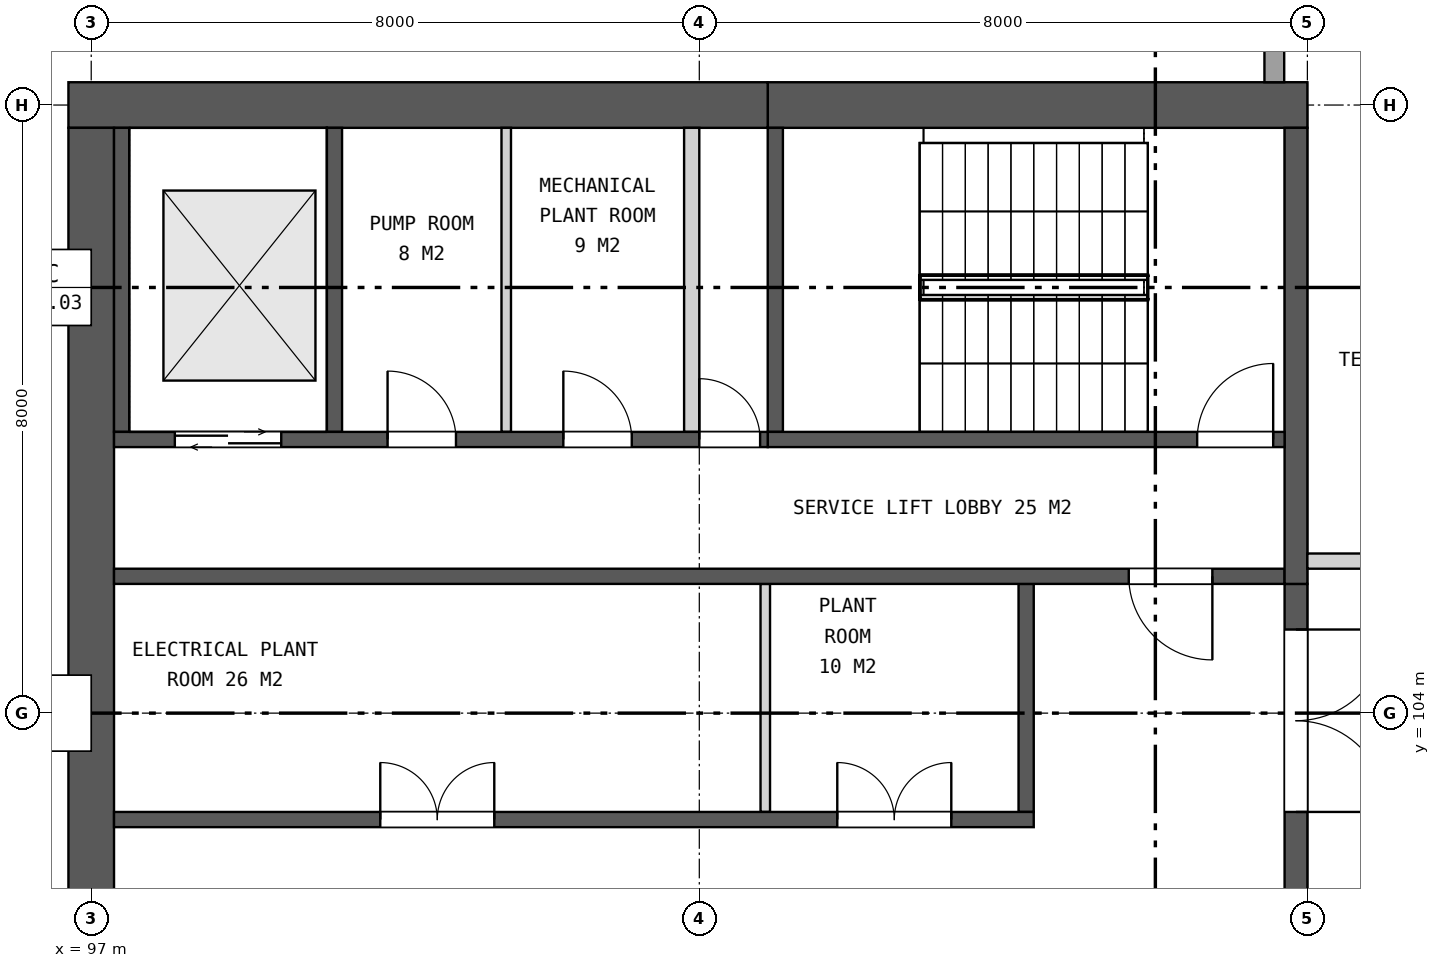
"""IFC4 building model, lengths in metres.
Left out: names, types, materials, properties, quantities, classifications, styles, units other than length and angle.
Written with IfcOpenShell. Run it as: python <this file> out.ifc"""

import sys

from ifc_helpers import new_model, si_unit, direction, frame, frame_2d, origin, place, context, subcontext, project, spatial, rectangle, extrude, element, fill, save


model = new_model("IFC4")
c1 = context("Model", 3, precision=1e-05, world=origin(), true_north=direction((0.0, 1.0)))
c2 = subcontext(c1, "Body", "Model", "MODEL_VIEW")
j1 = project(units=[si_unit("LENGTHUNIT", "METRE"), si_unit("PLANEANGLEUNIT", "RADIAN")], contexts=[c1])
p1 = place(None, origin())
s1 = spatial("IfcSite", under=j1, at=p1, CompositionType="ELEMENT")
p2 = place(p1, origin())
s2 = spatial("IfcBuilding", under=s1, at=p2, CompositionType="ELEMENT")
p3 = place(p2, frame((0.0, 0.0, 237.7)))
s3 = spatial("IfcBuildingStorey", under=s2, at=p3, CompositionType="ELEMENT", Elevation=237.7)
p4 = place(p3, frame((113.0, 112.0, 0.0), z_axis=(0.0, 0.0, 1.0), x_axis=(-1.0, 0.0, 0.0)))
e1 = element("IfcWall", 1, at=p4, inside=s3, PredefinedType="SHEAR", context=c2, shape_type="SweptSolid", body=[
    extrude(rectangle(XDim=7.1, YDim=0.6, at=frame_2d((3.55, 0.0))), origin(), (0.0, 0.0, 1.0), 7.4),
])
p5 = place(p3, frame((105.9, 112.0, 0.0), z_axis=(0.0, 0.0, 1.0), x_axis=(-1.0, 0.0, 0.0)))
e2 = element("IfcWall", 2, at=p5, inside=s3, PredefinedType="SHEAR", context=c2, shape_type="SweptSolid", body=[
    extrude(rectangle(XDim=9.2, YDim=0.6, at=frame_2d((4.6, 0.0))), origin(), (0.0, 0.0, 1.0), 7.4),
])
p6 = place(p3, frame((97.0, 111.7, 0.0), z_axis=(0.0, 0.0, 1.0), x_axis=(0.0, -1.0, 0.0)))
e3 = element("IfcWall", 3, at=p6, inside=s3, PredefinedType="SHEAR", context=c2, shape_type="SweptSolid", body=[
    extrude(rectangle(XDim=23.4, YDim=0.6, at=frame_2d((11.7, 0.0))), origin(), (0.0, 0.0, 1.0), 7.4),
])
p7 = place(p3, frame((112.85, 105.7, 0.0), z_axis=(0.0, 0.0, 1.0), x_axis=(0.0, -1.0, 0.0)))
e4 = element("IfcWall", 4, at=p7, inside=s3, PredefinedType="SHEAR", context=c2, shape_type="SweptSolid", body=[
    extrude(rectangle(XDim=11.4, YDim=0.3, at=frame_2d((5.7, 0.0))), origin(), (0.0, 0.0, 1.0), 7.4),
])
p8 = place(p7, frame((0.6, 0.0, 0.0)))
e5 = element("IfcOpeningElement", 5, at=p8, cuts=e4, PredefinedType="OPENING", context=c2, shape_type="SweptSolid", body=[
    extrude(rectangle(XDim=2.4, YDim=2.4, at=frame_2d((1.2, 1.2))), frame((0.0, 0.16, 0.0), z_axis=(0.0, -1.0, 0.0), x_axis=(1.0, 0.0, 0.0)), (0.0, 0.0, 1.0), 0.32),
])
p9 = place(p7, frame((4.5, 0.0, 0.0)))
e6 = element("IfcOpeningElement", 6, at=p9, cuts=e4, PredefinedType="OPENING", context=c2, shape_type="SweptSolid", body=[
    extrude(rectangle(XDim=2.4, YDim=2.4, at=frame_2d((1.2, 1.2))), frame((0.0, 0.16, 0.0), z_axis=(0.0, -1.0, 0.0), x_axis=(1.0, 0.0, 0.0)), (0.0, 0.0, 1.0), 0.32),
])
p10 = place(p7, frame((8.4, 0.0, 0.0)))
e7 = element("IfcOpeningElement", 7, at=p10, cuts=e4, PredefinedType="OPENING", context=c2, shape_type="SweptSolid", body=[
    extrude(rectangle(XDim=2.4, YDim=2.4, at=frame_2d((1.2, 1.2))), frame((0.0, 0.16, 0.0), z_axis=(0.0, -1.0, 0.0), x_axis=(1.0, 0.0, 0.0)), (0.0, 0.0, 1.0), 0.32),
])
p11 = place(p3, frame((109.3, 105.7, 0.0), z_axis=(0.0, 0.0, 1.0), x_axis=(0.0, -1.0, 0.0)))
e8 = element("IfcWall", 8, at=p11, inside=s3, PredefinedType="SHEAR", context=c2, shape_type="SweptSolid", body=[
    extrude(rectangle(XDim=3.0, YDim=0.2, at=frame_2d((1.5, 0.0))), origin(), (0.0, 0.0, 1.0), 7.4),
])
p12 = place(p3, frame((105.868, 105.7, 0.0), z_axis=(0.0, 0.0, 1.0), x_axis=(0.0, -1.0, 0.0)))
e9 = element("IfcWall", 9, at=p12, inside=s3, PredefinedType="PARTITIONING", context=c2, shape_type="SweptSolid", body=[
    extrude(rectangle(XDim=3.0, YDim=0.125, at=frame_2d((1.5, 0.0))), origin(), (0.0, 0.0, 1.0), 7.4),
])
p13 = place(p3, frame((109.4, 102.6, 0.0), z_axis=(0.0, 0.0, 1.0), x_axis=(-1.0, 0.0, 0.0)))
e10 = element("IfcWall", 10, at=p13, inside=s3, PredefinedType="SHEAR", context=c2, shape_type="SweptSolid", body=[
    extrude(rectangle(XDim=12.1, YDim=0.2, at=frame_2d((6.05, 0.0))), origin(), (0.0, 0.0, 1.0), 7.4),
])
p14 = place(p13, frame((1.085, 0.0, 0.0)))
e11 = element("IfcOpeningElement", 11, at=p14, cuts=e10, PredefinedType="OPENING", context=c2, shape_type="SweptSolid", body=[
    extrude(rectangle(XDim=1.5, YDim=2.1, at=frame_2d((0.75, 1.05))), frame((0.0, 0.11, 0.0), z_axis=(0.0, -1.0, 0.0), x_axis=(1.0, 0.0, 0.0)), (0.0, 0.0, 1.0), 0.22),
])
p15 = place(p13, frame((7.097, 0.0, 0.0)))
e12 = element("IfcOpeningElement", 12, at=p15, cuts=e10, PredefinedType="OPENING", context=c2, shape_type="SweptSolid", body=[
    extrude(rectangle(XDim=1.5, YDim=2.1, at=frame_2d((0.75, 1.05))), frame((0.0, 0.11, 0.0), z_axis=(0.0, -1.0, 0.0), x_axis=(1.0, 0.0, 0.0)), (0.0, 0.0, 1.0), 0.22),
])
p16 = place(p3, frame((112.7, 105.8, 0.0), z_axis=(0.0, 0.0, 1.0), x_axis=(-1.0, 0.0, 0.0)))
e13 = element("IfcWall", 13, at=p16, inside=s3, PredefinedType="SHEAR", context=c2, shape_type="SweptSolid", body=[
    extrude(rectangle(XDim=15.4, YDim=0.2, at=frame_2d((7.7, 0.0))), origin(), (0.0, 0.0, 1.0), 7.4),
])
p17 = place(p16, frame((0.95, 0.0, 0.0)))
e14 = element("IfcOpeningElement", 14, at=p17, cuts=e13, PredefinedType="OPENING", context=c2, shape_type="SweptSolid", body=[
    extrude(rectangle(XDim=1.1, YDim=2.1, at=frame_2d((0.55, 1.05))), frame((0.0, 0.11, 0.0), z_axis=(0.0, -1.0, 0.0), x_axis=(1.0, 0.0, 0.0)), (0.0, 0.0, 1.0), 0.22),
])
p18 = place(p3, frame((112.85, 111.7, 0.0), z_axis=(0.0, 0.0, 1.0), x_axis=(0.0, -1.0, 0.0)))
e15 = element("IfcWall", 15, at=p18, inside=s3, PredefinedType="SHEAR", context=c2, shape_type="SweptSolid", body=[
    extrude(rectangle(XDim=6.0, YDim=0.3, at=frame_2d((3.0, 0.0))), origin(), (0.0, 0.0, 1.0), 7.4),
])
for number, where, z_axis, x_axis in (
    (16, (106.0, 111.7, 0.0), (0.0, 0.0, 1.0), (0.0, -1.0, 0.0)),
    (17, (100.2, 111.7, 0.0), (0.0, 0.0, 1.0), (0.0, -1.0, 0.0)),
    (18, (97.4, 111.7, 0.0), (0.0, 0.0, 1.0), (0.0, -1.0, 0.0)),
):
    element("IfcWall", number, at=place(p3, frame(where, z_axis=z_axis, x_axis=x_axis)), inside=s3, PredefinedType="SHEAR", context=c2, shape_type="SweptSolid", body=[
        extrude(rectangle(XDim=4.0, YDim=0.2, at=frame_2d((2.0, 0.0))), origin(), (0.0, 0.0, 1.0), 7.4),
    ])
p19 = place(p3, frame((104.9, 111.7, 0.0), z_axis=(0.0, 0.0, 1.0), x_axis=(0.0, -1.0, 0.0)))
e19 = element("IfcWall", 19, at=p19, inside=s3, PredefinedType="PARTITIONING", context=c2, shape_type="SweptSolid", body=[
    extrude(rectangle(XDim=4.0, YDim=0.2, at=frame_2d((2.0, 0.0))), origin(), (0.0, 0.0, 1.0), 7.4),
])
p20 = place(p3, frame((102.46, 111.7, 0.0), z_axis=(0.0, 0.0, 1.0), x_axis=(0.0, -1.0, 0.0)))
e20 = element("IfcWall", 20, at=p20, inside=s3, PredefinedType="PARTITIONING", context=c2, shape_type="SweptSolid", body=[
    extrude(rectangle(XDim=4.0, YDim=0.125, at=frame_2d((2.0, 0.0))), origin(), (0.0, 0.0, 1.0), 7.4),
])
p21 = place(p3, frame((112.7, 107.6, 0.0), z_axis=(0.0, 0.0, 1.0), x_axis=(-1.0, 0.0, 0.0)))
e21 = element("IfcWall", 21, at=p21, inside=s3, PredefinedType="SHEAR", context=c2, shape_type="SweptSolid", body=[
    extrude(rectangle(XDim=6.8, YDim=0.2, at=frame_2d((3.4, 0.0))), origin(), (0.0, 0.0, 1.0), 7.4),
])
p22 = place(p21, frame((0.15, 0.0, 0.0)))
e22 = element("IfcOpeningElement", 22, at=p22, cuts=e21, PredefinedType="OPENING", context=c2, shape_type="SweptSolid", body=[
    extrude(rectangle(XDim=1.0, YDim=2.1, at=frame_2d((0.5, 1.05))), frame((0.0, 0.11, 0.0), z_axis=(0.0, -1.0, 0.0), x_axis=(1.0, 0.0, 0.0)), (0.0, 0.0, 1.0), 0.22),
])
p23 = place(p3, frame((105.9, 107.6, 0.0), z_axis=(0.0, 0.0, 1.0), x_axis=(-1.0, 0.0, 0.0)))
e23 = element("IfcWall", 23, at=p23, inside=s3, PredefinedType="SHEAR", context=c2, shape_type="SweptSolid", body=[
    extrude(rectangle(XDim=8.6, YDim=0.2, at=frame_2d((4.3, 0.0))), origin(), (0.0, 0.0, 1.0), 7.4),
])
p24 = place(p23, frame((0.1, 0.0, 0.0)))
e24 = element("IfcOpeningElement", 24, at=p24, cuts=e23, PredefinedType="OPENING", context=c2, shape_type="SweptSolid", body=[
    extrude(rectangle(XDim=0.8, YDim=2.1, at=frame_2d((0.4, 1.05))), frame((0.0, 0.11, 0.0), z_axis=(0.0, -1.0, 0.0), x_axis=(1.0, 0.0, 0.0)), (0.0, 0.0, 1.0), 0.22),
])
p25 = place(p23, frame((1.789, 0.0, 0.0)))
e25 = element("IfcOpeningElement", 25, at=p25, cuts=e23, PredefinedType="OPENING", context=c2, shape_type="SweptSolid", body=[
    extrude(rectangle(XDim=0.9, YDim=2.1, at=frame_2d((0.45, 1.05))), frame((0.0, 0.11, 0.0), z_axis=(0.0, -1.0, 0.0), x_axis=(1.0, 0.0, 0.0)), (0.0, 0.0, 1.0), 0.22),
])
p26 = place(p23, frame((4.101, 0.0, 0.0)))
e26 = element("IfcOpeningElement", 26, at=p26, cuts=e23, PredefinedType="OPENING", context=c2, shape_type="SweptSolid", body=[
    extrude(rectangle(XDim=0.9, YDim=2.1, at=frame_2d((0.45, 1.05))), frame((0.0, 0.11, 0.0), z_axis=(0.0, -1.0, 0.0), x_axis=(1.0, 0.0, 0.0)), (0.0, 0.0, 1.0), 0.22),
])
p27 = place(p23, frame((6.4, 0.0, 0.0)))
e27 = element("IfcOpeningElement", 27, at=p27, cuts=e23, PredefinedType="OPENING", context=c2, shape_type="SweptSolid", body=[
    extrude(rectangle(XDim=1.4, YDim=2.1, at=frame_2d((0.7, 1.05))), frame((0.0, 0.11, 0.0), z_axis=(0.0, -1.0, 0.0), x_axis=(1.0, 0.0, 0.0)), (0.0, 0.0, 1.0), 0.22),
])
p28 = place(p3, frame((112.565, 120.0, 0.0), z_axis=(0.0, 0.0, 1.0), x_axis=(0.0, -1.0, 0.0)))
e28 = element("IfcWall", 28, at=p28, inside=s3, PredefinedType="SOLIDWALL", context=c2, shape_type="SweptSolid", body=[
    extrude(rectangle(XDim=7.7, YDim=0.26, at=frame_2d((3.85, 0.0))), origin(), (0.0, 0.0, 1.0), 7.1),
])
p29 = place(p28, frame((0.8, 0.0, 2.2)))
e29 = element("IfcOpeningElement", 29, at=p29, cuts=e28, PredefinedType="OPENING", context=c2, shape_type="SweptSolid", body=[
    extrude(rectangle(XDim=2.0, YDim=3.0, at=frame_2d((1.0, 1.5))), frame((0.0, 0.14, 0.0), z_axis=(0.0, -1.0, 0.0), x_axis=(1.0, 0.0, 0.0)), (0.0, 0.0, 1.0), 0.28),
])
p30 = place(p28, frame((5.2, 0.0, 1.2)))
e30 = element("IfcOpeningElement", 30, at=p30, cuts=e28, PredefinedType="OPENING", context=c2, shape_type="SweptSolid", body=[
    extrude(rectangle(XDim=2.0, YDim=3.0, at=frame_2d((1.0, 1.5))), frame((0.0, 0.14, 0.0), z_axis=(0.0, -1.0, 0.0), x_axis=(1.0, 0.0, 0.0)), (0.0, 0.0, 1.0), 0.28),
])
p31 = place(p3, frame((113.0, 106.0, 0.0), z_axis=(0.0, 0.0, 1.0), x_axis=(1.0, 0.0, 0.0)))
e31 = element("IfcWall", 31, at=p31, inside=s3, PredefinedType="SOLIDWALL", context=c2, shape_type="SweptSolid", body=[
    extrude(rectangle(XDim=5.5, YDim=0.2, at=frame_2d((2.75, 0.0))), origin(), (0.0, 0.0, 1.0), 6.643),
])
p32 = place(p31, frame((2.25, 0.0, 0.0)))
e32 = element("IfcOpeningElement", 32, at=p32, cuts=e31, PredefinedType="OPENING", context=c2, shape_type="SweptSolid", body=[
    extrude(rectangle(XDim=1.0, YDim=2.1, at=frame_2d((0.5, 1.05))), frame((0.0, 0.11, 0.0), z_axis=(0.0, -1.0, 0.0), x_axis=(1.0, 0.0, 0.0)), (0.0, 0.0, 1.0), 0.22),
])
p33 = place(p8, origin())
e33 = element("IfcDoor", 33, at=p33, inside=s3, OperationType="DOUBLE_DOOR_SINGLE_SWING", PredefinedType="DOOR", context=c2, shape_type="SweptSolid", body=[
    extrude(rectangle(XDim=2.4, YDim=2.4, at=frame_2d((1.2, 1.2))), frame((0.0, 0.025, 0.0), z_axis=(0.0, -1.0, 0.0), x_axis=(1.0, 0.0, 0.0)), (0.0, 0.0, 1.0), 0.05),
])
fill(e5, e33)
p34 = place(p14, frame((1.5, 0.0, 0.0), z_axis=(0.0, 0.0, 1.0), x_axis=(-1.0, 0.0, 0.0)))
e34 = element("IfcDoor", 34, at=p34, inside=s3, OperationType="DOUBLE_DOOR_SINGLE_SWING", PredefinedType="DOOR", context=c2, shape_type="SweptSolid", body=[
    extrude(rectangle(XDim=1.5, YDim=2.1, at=frame_2d((0.75, 1.05))), frame((0.0, 0.025, 0.0), z_axis=(0.0, -1.0, 0.0), x_axis=(1.0, 0.0, 0.0)), (0.0, 0.0, 1.0), 0.05),
])
fill(e11, e34)
p35 = place(p15, frame((1.5, 0.0, 0.0), z_axis=(0.0, 0.0, 1.0), x_axis=(-1.0, 0.0, 0.0)))
e35 = element("IfcDoor", 35, at=p35, inside=s3, OperationType="DOUBLE_DOOR_SINGLE_SWING", PredefinedType="DOOR", context=c2, shape_type="SweptSolid", body=[
    extrude(rectangle(XDim=1.5, YDim=2.1, at=frame_2d((0.75, 1.05))), frame((0.0, 0.025, 0.0), z_axis=(0.0, -1.0, 0.0), x_axis=(1.0, 0.0, 0.0)), (0.0, 0.0, 1.0), 0.05),
])
fill(e12, e35)
p36 = place(p17, origin())
e36 = element("IfcDoor", 36, at=p36, inside=s3, OperationType="SINGLE_SWING_LEFT", PredefinedType="DOOR", context=c2, shape_type="SweptSolid", body=[
    extrude(rectangle(XDim=1.1, YDim=2.1, at=frame_2d((0.55, 1.05))), frame((0.0, 0.025, 0.0), z_axis=(0.0, -1.0, 0.0), x_axis=(1.0, 0.0, 0.0)), (0.0, 0.0, 1.0), 0.05),
])
fill(e14, e36)
p37 = place(p22, frame((1.0, 0.0, 0.0), z_axis=(0.0, 0.0, 1.0), x_axis=(-1.0, 0.0, 0.0)))
e37 = element("IfcDoor", 37, at=p37, inside=s3, OperationType="SINGLE_SWING_RIGHT", PredefinedType="DOOR", context=c2, shape_type="SweptSolid", body=[
    extrude(rectangle(XDim=1.0, YDim=2.1, at=frame_2d((0.5, 1.05))), frame((0.0, 0.025, 0.0), z_axis=(0.0, -1.0, 0.0), x_axis=(1.0, 0.0, 0.0)), (0.0, 0.0, 1.0), 0.05),
])
fill(e22, e37)
p38 = place(p24, frame((0.8, 0.0, 0.0), z_axis=(0.0, 0.0, 1.0), x_axis=(-1.0, 0.0, 0.0)))
e38 = element("IfcDoor", 38, at=p38, inside=s3, OperationType="SINGLE_SWING_LEFT", PredefinedType="DOOR", context=c2, shape_type="SweptSolid", body=[
    extrude(rectangle(XDim=0.8, YDim=2.1, at=frame_2d((0.4, 1.05))), frame((0.0, 0.025, 0.0), z_axis=(0.0, -1.0, 0.0), x_axis=(1.0, 0.0, 0.0)), (0.0, 0.0, 1.0), 0.05),
])
fill(e24, e38)
p39 = place(p25, frame((0.9, 0.0, 0.0), z_axis=(0.0, 0.0, 1.0), x_axis=(-1.0, 0.0, 0.0)))
e39 = element("IfcDoor", 39, at=p39, inside=s3, OperationType="SINGLE_SWING_LEFT", PredefinedType="DOOR", context=c2, shape_type="SweptSolid", body=[
    extrude(rectangle(XDim=0.9, YDim=2.1, at=frame_2d((0.45, 1.05))), frame((0.0, 0.025, 0.0), z_axis=(0.0, -1.0, 0.0), x_axis=(1.0, 0.0, 0.0)), (0.0, 0.0, 1.0), 0.05),
])
fill(e25, e39)
p40 = place(p26, frame((0.9, 0.0, 0.0), z_axis=(0.0, 0.0, 1.0), x_axis=(-1.0, 0.0, 0.0)))
e40 = element("IfcDoor", 40, at=p40, inside=s3, OperationType="SINGLE_SWING_LEFT", PredefinedType="DOOR", context=c2, shape_type="SweptSolid", body=[
    extrude(rectangle(XDim=0.9, YDim=2.1, at=frame_2d((0.45, 1.05))), frame((0.0, 0.025, 0.0), z_axis=(0.0, -1.0, 0.0), x_axis=(1.0, 0.0, 0.0)), (0.0, 0.0, 1.0), 0.05),
])
fill(e26, e40)
p41 = place(p27, origin())
e41 = element("IfcDoor", 41, at=p41, inside=s3, OperationType="DOUBLE_DOOR_SLIDING", PredefinedType="DOOR", context=c2, shape_type="SweptSolid", body=[
    extrude(rectangle(XDim=1.4, YDim=2.1, at=frame_2d((0.7, 1.05))), frame((0.0, 0.025, 0.0), z_axis=(0.0, -1.0, 0.0), x_axis=(1.0, 0.0, 0.0)), (0.0, 0.0, 1.0), 0.05),
])
fill(e27, e41)
save(model, sys.argv[1])
